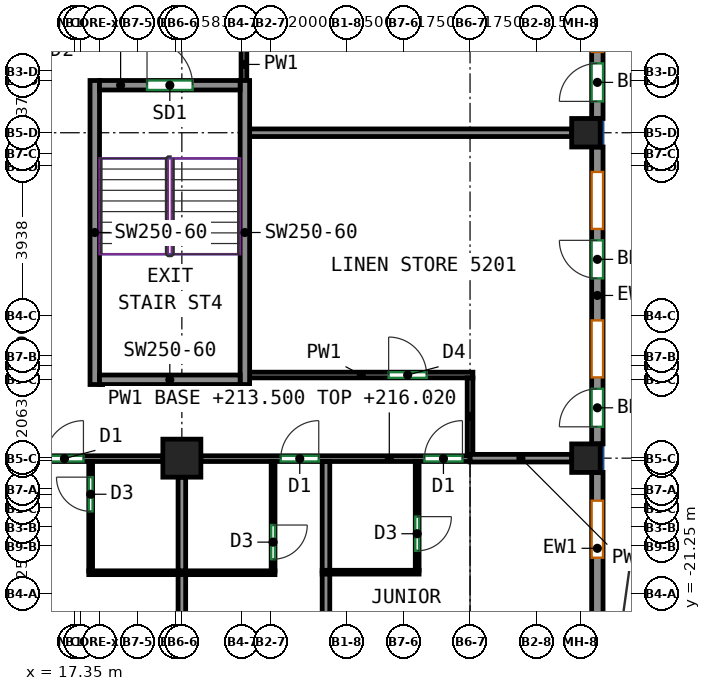
"""IFC4 building model, lengths in metres.
Left out: names, types, materials, properties, quantities, classifications, styles, units other than length and angle.
Written with IfcOpenShell. Run it as: python <this file> out.ifc"""

import sys

from ifc_helpers import new_model, si_unit, direction, frame, frame_2d, origin, origin_2d, place, context, subcontext, project, spatial, rectangle, extrude, source, transform, mapped, element, fill, save


model = new_model("IFC4")
c1 = context("Model", 3, precision=1e-05, world=origin(), true_north=direction((0.0, 1.0)))
c2 = subcontext(c1, "Body", "Model", "MODEL_VIEW")
j1 = project(units=[si_unit("LENGTHUNIT", "METRE"), si_unit("PLANEANGLEUNIT", "RADIAN")], contexts=[c1])
p1 = place(None, origin())
s1 = spatial("IfcSite", under=j1, at=p1, CompositionType="ELEMENT")
p2 = place(p1, origin())
s2 = spatial("IfcBuilding", under=s1, at=p2, CompositionType="ELEMENT")
p3 = place(p2, frame((0.0, 0.0, 213.5)))
s3 = spatial("IfcBuildingStorey", under=s2, at=p3, CompositionType="ELEMENT", Elevation=213.5)
m1 = source(origin(), c2, "Body", "SweptSolid", [
    extrude(rectangle(XDim=1.0, YDim=1.0, at=origin_2d()), origin(), (0.0, 0.0, 1.0), 3.12),
])
p4 = place(p3, frame((20.167, -17.688, 0.0), z_axis=(0.0, 0.0, 1.0), x_axis=(1.0, 0.0, 0.0)))
e1 = element("IfcColumn", 1, at=p4, inside=s3, PredefinedType="COLUMN", context=c2, shape_type="MappedRepresentation", body=[
    mapped(m1, transform((0.0, 0.0, 0.0))),
])
m2 = source(origin(), c2, "Body", "SweptSolid", [
    extrude(rectangle(XDim=0.75, YDim=0.75, at=origin_2d()), origin(), (0.0, 0.0, 1.0), 3.12),
])
for number, where, z_axis, x_axis in (
    (2, (30.8, -17.688, 0.0), (0.0, 0.0, 1.0), (1.0, 0.0, 0.0)),
    (3, (30.8, -9.125, 0.0), (0.0, 0.0, 1.0), (1.0, 0.0, 0.0)),
):
    element("IfcColumn", number, at=place(p3, frame(where, z_axis=z_axis, x_axis=x_axis)), inside=s3, PredefinedType="COLUMN", context=c2, shape_type="MappedRepresentation", body=[
        mapped(m2, transform((0.0, 0.0, 0.0))),
    ])
m3 = source(origin(), c2, "Body", "SweptSolid", [
    extrude(rectangle(XDim=8.0, YDim=0.25, at=frame_2d((4.0, 0.0))), origin(), (0.0, 0.0, 1.0), 3.12),
])
for number, where, z_axis, x_axis in (
    (4, (17.875, -15.75, 0.0), (0.0, 0.0, 1.0), (0.0, 1.0, 0.0)),
    (5, (21.825, -15.75, 0.0), (0.0, 0.0, 1.0), (0.0, 1.0, 0.0)),
):
    element("IfcWall", number, at=place(p3, frame(where, z_axis=z_axis, x_axis=x_axis)), inside=s3, PredefinedType="SHEAR", context=c2, shape_type="MappedRepresentation", body=[
        mapped(m3, transform((0.0, 0.0, 0.0))),
    ])
m4 = source(origin(), c2, "Body", "SweptSolid", [
    extrude(rectangle(XDim=3.7, YDim=0.25, at=frame_2d((1.85, 0.0))), origin(), (0.0, 0.0, 1.0), 3.12),
])
p5 = place(p3, frame((18.0, -15.625, 0.0), z_axis=(0.0, 0.0, 1.0), x_axis=(1.0, 0.0, 0.0)))
e6 = element("IfcWall", 6, at=p5, inside=s3, PredefinedType="SHEAR", context=c2, shape_type="MappedRepresentation", body=[
    mapped(m4, transform((0.0, 0.0, 0.0))),
])
p6 = place(p3, frame((18.0, -7.875, 0.0), z_axis=(0.0, 0.0, 1.0), x_axis=(1.0, 0.0, 0.0)))
e7 = element("IfcWall", 7, at=p6, inside=s3, PredefinedType="SHEAR", context=c2, shape_type="MappedRepresentation", body=[
    mapped(m4, transform((0.0, 0.0, 0.0))),
])
p7 = place(p6, frame((1.25, 0.0, 0.0)))
e8 = element("IfcOpeningElement", 8, at=p7, cuts=e7, PredefinedType="OPENING", context=c2, shape_type="SweptSolid", body=[
    extrude(rectangle(XDim=1.2, YDim=2.1, at=frame_2d((0.6, 1.05))), frame((0.0, 0.135, 0.0), z_axis=(0.0, -1.0, 0.0), x_axis=(1.0, 0.0, 0.0)), (0.0, 0.0, 1.0), 0.27),
])
m5 = source(origin(), c2, "Body", "SweptSolid", [
    extrude(rectangle(XDim=3.994, YDim=0.3, at=frame_2d((1.997, 0.0))), origin(), (0.0, 0.0, 1.0), 3.12),
])
p8 = place(p3, frame((31.1, -22.057, 0.0), z_axis=(0.0, 0.0, 1.0), x_axis=(0.0, 1.0, 0.0)))
e9 = element("IfcWall", 9, at=p8, inside=s3, PredefinedType="SOLIDWALL", context=c2, shape_type="MappedRepresentation", body=[
    mapped(m5, transform((0.0, 0.0, 0.0))),
])
p9 = place(p8, frame((1.75, 0.0, 0.85)))
e10 = element("IfcOpeningElement", 10, at=p9, cuts=e9, PredefinedType="OPENING", context=c2, shape_type="SweptSolid", body=[
    extrude(rectangle(XDim=1.5, YDim=1.95, at=frame_2d((0.75, 0.975))), frame((0.0, 0.16, 0.0), z_axis=(0.0, -1.0, 0.0), x_axis=(1.0, 0.0, 0.0)), (0.0, 0.0, 1.0), 0.32),
])
m6 = source(origin(), c2, "Body", "SweptSolid", [
    extrude(rectangle(XDim=7.812, YDim=0.3, at=frame_2d((3.906, 0.0))), origin(), (0.0, 0.0, 1.0), 3.12),
])
p10 = place(p3, frame((31.1, -17.312, 0.0), z_axis=(0.0, 0.0, 1.0), x_axis=(0.0, 1.0, 0.0)))
e11 = element("IfcWall", 11, at=p10, inside=s3, PredefinedType="SOLIDWALL", context=c2, shape_type="MappedRepresentation", body=[
    mapped(m6, transform((0.0, 0.0, 0.0))),
])
p11 = place(p10, frame((1.75, 0.0, 0.85)))
e12 = element("IfcOpeningElement", 12, at=p11, cuts=e11, PredefinedType="OPENING", context=c2, shape_type="SweptSolid", body=[
    extrude(rectangle(XDim=1.5, YDim=1.95, at=frame_2d((0.75, 0.975))), frame((0.0, 0.16, 0.0), z_axis=(0.0, -1.0, 0.0), x_axis=(1.0, 0.0, 0.0)), (0.0, 0.0, 1.0), 0.32),
])
p12 = place(p10, frame((0.45, 0.0, 0.0)))
e13 = element("IfcOpeningElement", 13, at=p12, cuts=e11, PredefinedType="OPENING", context=c2, shape_type="SweptSolid", body=[
    extrude(rectangle(XDim=1.0, YDim=2.1, at=frame_2d((0.5, 1.05))), frame((0.0, 0.16, 0.0), z_axis=(0.0, -1.0, 0.0), x_axis=(1.0, 0.0, 0.0)), (0.0, 0.0, 1.0), 0.32),
])
p13 = place(p10, frame((5.656, 0.0, 0.85)))
e14 = element("IfcOpeningElement", 14, at=p13, cuts=e11, PredefinedType="OPENING", context=c2, shape_type="SweptSolid", body=[
    extrude(rectangle(XDim=1.5, YDim=1.95, at=frame_2d((0.75, 0.975))), frame((0.0, 0.16, 0.0), z_axis=(0.0, -1.0, 0.0), x_axis=(1.0, 0.0, 0.0)), (0.0, 0.0, 1.0), 0.32),
])
p14 = place(p10, frame((4.356, 0.0, 0.0)))
e15 = element("IfcOpeningElement", 15, at=p14, cuts=e11, PredefinedType="OPENING", context=c2, shape_type="SweptSolid", body=[
    extrude(rectangle(XDim=1.0, YDim=2.1, at=frame_2d((0.5, 1.05))), frame((0.0, 0.16, 0.0), z_axis=(0.0, -1.0, 0.0), x_axis=(1.0, 0.0, 0.0)), (0.0, 0.0, 1.0), 0.32),
])
p15 = place(p3, frame((31.1, -8.75, 0.0), z_axis=(0.0, 0.0, 1.0), x_axis=(0.0, 1.0, 0.0)))
e16 = element("IfcWall", 16, at=p15, inside=s3, PredefinedType="SOLIDWALL", context=c2, shape_type="MappedRepresentation", body=[
    mapped(m6, transform((0.0, 0.0, 0.0))),
])
p16 = place(p15, frame((1.75, 0.0, 0.85)))
e17 = element("IfcOpeningElement", 17, at=p16, cuts=e16, PredefinedType="OPENING", context=c2, shape_type="SweptSolid", body=[
    extrude(rectangle(XDim=1.5, YDim=1.95, at=frame_2d((0.75, 0.975))), frame((0.0, 0.16, 0.0), z_axis=(0.0, -1.0, 0.0), x_axis=(1.0, 0.0, 0.0)), (0.0, 0.0, 1.0), 0.32),
])
p17 = place(p15, frame((0.45, 0.0, 0.0)))
e18 = element("IfcOpeningElement", 18, at=p17, cuts=e16, PredefinedType="OPENING", context=c2, shape_type="SweptSolid", body=[
    extrude(rectangle(XDim=1.0, YDim=2.1, at=frame_2d((0.5, 1.05))), frame((0.0, 0.16, 0.0), z_axis=(0.0, -1.0, 0.0), x_axis=(1.0, 0.0, 0.0)), (0.0, 0.0, 1.0), 0.32),
])
p18 = place(p15, frame((5.656, 0.0, 0.85)))
e19 = element("IfcOpeningElement", 19, at=p18, cuts=e16, PredefinedType="OPENING", context=c2, shape_type="SweptSolid", body=[
    extrude(rectangle(XDim=1.5, YDim=1.95, at=frame_2d((0.75, 0.975))), frame((0.0, 0.16, 0.0), z_axis=(0.0, -1.0, 0.0), x_axis=(1.0, 0.0, 0.0)), (0.0, 0.0, 1.0), 0.32),
])
p19 = place(p15, frame((4.356, 0.0, 0.0)))
e20 = element("IfcOpeningElement", 20, at=p19, cuts=e16, PredefinedType="OPENING", context=c2, shape_type="SweptSolid", body=[
    extrude(rectangle(XDim=1.0, YDim=2.1, at=frame_2d((0.5, 1.05))), frame((0.0, 0.16, 0.0), z_axis=(0.0, -1.0, 0.0), x_axis=(1.0, 0.0, 0.0)), (0.0, 0.0, 1.0), 0.32),
])
p20 = place(p3, frame((13.083, -17.7, 0.0), z_axis=(0.0, 0.0, 1.0), x_axis=(1.0, 0.0, 0.0)))
e21 = element("IfcWall", 21, at=p20, inside=s3, PredefinedType="PARTITIONING", context=c2, shape_type="SweptSolid", body=[
    extrude(rectangle(XDim=6.584, YDim=0.15, at=frame_2d((3.292, 0.0))), origin(), (0.0, 0.0, 1.0), 3.12),
])
p21 = place(p20, frame((2.102, 0.0, 0.0)))
e22 = element("IfcOpeningElement", 22, at=p21, cuts=e21, PredefinedType="OPENING", context=c2, shape_type="SweptSolid", body=[
    extrude(rectangle(XDim=1.0, YDim=2.1, at=frame_2d((0.5, 1.05))), frame((0.0, 0.085, 0.0), z_axis=(0.0, -1.0, 0.0), x_axis=(1.0, 0.0, 0.0)), (0.0, 0.0, 1.0), 0.17),
])
p22 = place(p20, frame((3.494, 0.0, 0.0)))
e23 = element("IfcOpeningElement", 23, at=p22, cuts=e21, PredefinedType="OPENING", context=c2, shape_type="SweptSolid", body=[
    extrude(rectangle(XDim=1.0, YDim=2.1, at=frame_2d((0.5, 1.05))), frame((0.0, 0.085, 0.0), z_axis=(0.0, -1.0, 0.0), x_axis=(1.0, 0.0, 0.0)), (0.0, 0.0, 1.0), 0.17),
])
p23 = place(p3, frame((20.667, -17.7, 0.0), z_axis=(0.0, 0.0, 1.0), x_axis=(1.0, 0.0, 0.0)))
e24 = element("IfcWall", 24, at=p23, inside=s3, PredefinedType="PARTITIONING", context=c2, shape_type="SweptSolid", body=[
    extrude(rectangle(XDim=7.083, YDim=0.15, at=frame_2d((3.542, 0.0))), origin(), (0.0, 0.0, 1.0), 2.52),
])
p24 = place(p23, frame((2.102, 0.0, 0.0)))
e25 = element("IfcOpeningElement", 25, at=p24, cuts=e24, PredefinedType="OPENING", context=c2, shape_type="SweptSolid", body=[
    extrude(rectangle(XDim=1.0, YDim=2.1, at=frame_2d((0.5, 1.05))), frame((0.0, 0.085, 0.0), z_axis=(0.0, -1.0, 0.0), x_axis=(1.0, 0.0, 0.0)), (0.0, 0.0, 1.0), 0.17),
])
p25 = place(p23, frame((5.883, 0.0, 0.0)))
e26 = element("IfcOpeningElement", 26, at=p25, cuts=e24, PredefinedType="OPENING", context=c2, shape_type="SweptSolid", body=[
    extrude(rectangle(XDim=1.0, YDim=2.1, at=frame_2d((0.5, 1.05))), frame((0.0, 0.085, 0.0), z_axis=(0.0, -1.0, 0.0), x_axis=(1.0, 0.0, 0.0)), (0.0, 0.0, 1.0), 0.17),
])
p26 = place(p3, frame((21.8, -7.75, 0.0), z_axis=(0.0, 0.0, 1.0), x_axis=(0.0, 1.0, 0.0)))
e27 = element("IfcWall", 27, at=p26, inside=s3, PredefinedType="PARTITIONING", context=c2, shape_type="SweptSolid", body=[
    extrude(rectangle(XDim=2.817, YDim=0.15, at=frame_2d((1.408, 0.0))), origin(), (0.0, 0.0, 1.0), 3.12),
])
p27 = place(p26, frame((1.009, 0.0, 0.0)))
e28 = element("IfcOpeningElement", 28, at=p27, cuts=e27, PredefinedType="OPENING", context=c2, shape_type="SweptSolid", body=[
    extrude(rectangle(XDim=0.9, YDim=2.1, at=frame_2d((0.45, 1.05))), frame((0.0, 0.085, 0.0), z_axis=(0.0, -1.0, 0.0), x_axis=(1.0, 0.0, 0.0)), (0.0, 0.0, 1.0), 0.17),
])
p28 = place(p3, frame((21.95, -15.5, 0.0), z_axis=(0.0, 0.0, 1.0), x_axis=(1.0, 0.0, 0.0)))
e29 = element("IfcWall", 29, at=p28, inside=s3, PredefinedType="PARTITIONING", context=c2, shape_type="SweptSolid", body=[
    extrude(rectangle(XDim=5.875, YDim=0.15, at=frame_2d((2.938, 0.0))), origin(), (0.0, 0.0, 1.0), 3.12),
])
p29 = place(p28, frame((3.658, 0.0, 0.0)))
e30 = element("IfcOpeningElement", 30, at=p29, cuts=e29, PredefinedType="OPENING", context=c2, shape_type="SweptSolid", body=[
    extrude(rectangle(XDim=1.0, YDim=2.1, at=frame_2d((0.5, 1.05))), frame((0.0, 0.085, 0.0), z_axis=(0.0, -1.0, 0.0), x_axis=(1.0, 0.0, 0.0)), (0.0, 0.0, 1.0), 0.17),
])
p30 = place(p3, frame((27.75, -17.598, 0.0), z_axis=(0.0, 0.0, 1.0), x_axis=(0.0, 1.0, 0.0)))
e31 = element("IfcWall", 31, at=p30, inside=s3, PredefinedType="PARTITIONING", context=c2, shape_type="SweptSolid", body=[
    extrude(rectangle(XDim=2.023, YDim=0.15, at=frame_2d((1.011, 0.0))), origin(), (0.0, 0.0, 1.0), 2.52),
])
p31 = place(p3, frame((17.767, -20.652, 0.0), z_axis=(0.0, 0.0, 1.0), x_axis=(0.0, 1.0, 0.0)))
e32 = element("IfcWall", 32, at=p31, inside=s3, PredefinedType="PARTITIONING", context=c2, shape_type="SweptSolid", body=[
    extrude(rectangle(XDim=2.875, YDim=0.1, at=frame_2d((1.438, 0.0))), origin(), (0.0, 0.0, 1.0), 3.12),
])
p32 = place(p31, frame((1.565, 0.0, 0.0)))
e33 = element("IfcOpeningElement", 33, at=p32, cuts=e32, PredefinedType="OPENING", context=c2, shape_type="SweptSolid", body=[
    extrude(rectangle(XDim=0.9, YDim=2.1, at=frame_2d((0.45, 1.05))), frame((0.0, 0.06, 0.0), z_axis=(0.0, -1.0, 0.0), x_axis=(1.0, 0.0, 0.0)), (0.0, 0.0, 1.0), 0.12),
])
p33 = place(p3, frame((17.717, -20.702, 0.0), z_axis=(0.0, 0.0, 1.0), x_axis=(1.0, 0.0, 0.0)))
e34 = element("IfcWall", 34, at=p33, inside=s3, PredefinedType="PARTITIONING", context=c2, shape_type="SweptSolid", body=[
    extrude(rectangle(XDim=4.9, YDim=0.1, at=frame_2d((2.45, 0.0))), origin(), (0.0, 0.0, 1.0), 3.12),
])
p34 = place(p3, frame((20.167, -25.425, 0.0), z_axis=(0.0, 0.0, 1.0), x_axis=(0.0, 1.0, 0.0)))
e35 = element("IfcWall", 35, at=p34, inside=s3, PredefinedType="PARTITIONING", context=c2, shape_type="SweptSolid", body=[
    extrude(rectangle(XDim=4.673, YDim=0.2, at=frame_2d((2.336, 0.0))), origin(), (0.0, 0.0, 1.0), 3.12),
])
p35 = place(p3, frame((20.167, -20.652, 0.0), z_axis=(0.0, 0.0, 1.0), x_axis=(0.0, 1.0, 0.0)))
e36 = element("IfcWall", 36, at=p35, inside=s3, PredefinedType="PARTITIONING", context=c2, shape_type="SweptSolid", body=[
    extrude(rectangle(XDim=2.464, YDim=0.2, at=frame_2d((1.232, 0.0))), origin(), (0.0, 0.0, 1.0), 3.12),
])
p36 = place(p3, frame((22.567, -17.777, 0.0), z_axis=(0.0, 0.0, 1.0), x_axis=(0.0, -1.0, 0.0)))
e37 = element("IfcWall", 37, at=p36, inside=s3, PredefinedType="PARTITIONING", context=c2, shape_type="SweptSolid", body=[
    extrude(rectangle(XDim=2.875, YDim=0.1, at=frame_2d((1.438, 0.0))), origin(), (0.0, 0.0, 1.0), 3.12),
])
p37 = place(p36, frame((1.67, 0.0, 0.0)))
e38 = element("IfcOpeningElement", 38, at=p37, cuts=e37, PredefinedType="OPENING", context=c2, shape_type="SweptSolid", body=[
    extrude(rectangle(XDim=0.9, YDim=2.1, at=frame_2d((0.45, 1.05))), frame((0.0, 0.06, 0.0), z_axis=(0.0, -1.0, 0.0), x_axis=(1.0, 0.0, 0.0)), (0.0, 0.0, 1.0), 0.12),
])
p38 = place(p3, frame((23.959, -26.0, 0.0), z_axis=(0.0, 0.0, 1.0), x_axis=(0.0, 1.0, 0.0)))
e39 = element("IfcWall", 39, at=p38, inside=s3, PredefinedType="PARTITIONING", context=c2, shape_type="SweptSolid", body=[
    extrude(rectangle(XDim=5.272, YDim=0.2, at=frame_2d((2.636, 0.0))), origin(), (0.0, 0.0, 1.0), 3.12),
])
p39 = place(p3, frame((23.959, -20.648, 0.0), z_axis=(0.0, 0.0, 1.0), x_axis=(0.0, 1.0, 0.0)))
e40 = element("IfcWall", 40, at=p39, inside=s3, PredefinedType="PARTITIONING", context=c2, shape_type="SweptSolid", body=[
    extrude(rectangle(XDim=2.871, YDim=0.2, at=frame_2d((1.436, 0.0))), origin(), (0.0, 0.0, 1.0), 3.12),
])
p40 = place(p3, frame((23.859, -20.688, 0.0), z_axis=(0.0, 0.0, 1.0), x_axis=(1.0, 0.0, 0.0)))
e41 = element("IfcWall", 41, at=p40, inside=s3, PredefinedType="PARTITIONING", context=c2, shape_type="SweptSolid", body=[
    extrude(rectangle(XDim=2.55, YDim=0.1, at=frame_2d((1.275, 0.0))), origin(), (0.0, 0.0, 1.0), 3.12),
])
p41 = place(p3, frame((26.359, -17.777, 0.0), z_axis=(0.0, 0.0, 1.0), x_axis=(0.0, -1.0, 0.0)))
e42 = element("IfcWall", 42, at=p41, inside=s3, PredefinedType="PARTITIONING", context=c2, shape_type="SweptSolid", body=[
    extrude(rectangle(XDim=2.861, YDim=0.1, at=frame_2d((1.43, 0.0))), origin(), (0.0, 0.0, 1.0), 3.12),
])
p42 = place(p41, frame((1.449, 0.0, 0.0)))
e43 = element("IfcOpeningElement", 43, at=p42, cuts=e42, PredefinedType="OPENING", context=c2, shape_type="SweptSolid", body=[
    extrude(rectangle(XDim=0.9, YDim=2.1, at=frame_2d((0.45, 1.05))), frame((0.0, 0.06, 0.0), z_axis=(0.0, -1.0, 0.0), x_axis=(1.0, 0.0, 0.0)), (0.0, 0.0, 1.0), 0.12),
])
p43 = place(p3, frame((27.752, -17.688, 0.0), z_axis=(0.0, 0.0, 1.0), x_axis=(1.0, 0.0, 0.0)))
e44 = element("IfcWall", 44, at=p43, inside=s3, PredefinedType="PARTITIONING", context=c2, shape_type="SweptSolid", body=[
    extrude(rectangle(XDim=2.673, YDim=0.2, at=frame_2d((1.336, 0.0))), origin(), (0.0, 0.0, 1.0), 2.52),
])
p44 = place(p3, frame((21.95, -9.125, 0.0), z_axis=(0.0, 0.0, 1.0), x_axis=(1.0, 0.0, 0.0)))
e45 = element("IfcWall", 45, at=p44, inside=s3, PredefinedType="PARTITIONING", context=c2, shape_type="SweptSolid", body=[
    extrude(rectangle(XDim=8.475, YDim=0.2, at=frame_2d((4.238, 0.0))), origin(), (0.0, 0.0, 1.0), 3.12),
])
p45 = place(p9, origin())
e46 = element("IfcWindow", 46, at=p45, inside=s3, PartitioningType="SINGLE_PANEL", PredefinedType="WINDOW", context=c2, shape_type="SweptSolid", body=[
    extrude(rectangle(XDim=1.5, YDim=1.95, at=frame_2d((0.75, 0.975))), frame((0.0, 0.03, 0.0), z_axis=(0.0, -1.0, 0.0), x_axis=(1.0, 0.0, 0.0)), (0.0, 0.0, 1.0), 0.06),
])
fill(e10, e46)
p46 = place(p11, origin())
e47 = element("IfcWindow", 47, at=p46, inside=s3, PartitioningType="SINGLE_PANEL", PredefinedType="WINDOW", context=c2, shape_type="SweptSolid", body=[
    extrude(rectangle(XDim=1.5, YDim=1.95, at=frame_2d((0.75, 0.975))), frame((0.0, 0.03, 0.0), z_axis=(0.0, -1.0, 0.0), x_axis=(1.0, 0.0, 0.0)), (0.0, 0.0, 1.0), 0.06),
])
fill(e12, e47)
p47 = place(p12, origin())
e48 = element("IfcDoor", 48, at=p47, inside=s3, OperationType="SINGLE_SWING_LEFT", PredefinedType="DOOR", context=c2, shape_type="SweptSolid", body=[
    extrude(rectangle(XDim=1.0, YDim=2.1, at=frame_2d((0.5, 1.05))), frame((0.0, 0.025, 0.0), z_axis=(0.0, -1.0, 0.0), x_axis=(1.0, 0.0, 0.0)), (0.0, 0.0, 1.0), 0.05),
])
fill(e13, e48)
p48 = place(p13, origin())
e49 = element("IfcWindow", 49, at=p48, inside=s3, PartitioningType="SINGLE_PANEL", PredefinedType="WINDOW", context=c2, shape_type="SweptSolid", body=[
    extrude(rectangle(XDim=1.5, YDim=1.95, at=frame_2d((0.75, 0.975))), frame((0.0, 0.03, 0.0), z_axis=(0.0, -1.0, 0.0), x_axis=(1.0, 0.0, 0.0)), (0.0, 0.0, 1.0), 0.06),
])
fill(e14, e49)
p49 = place(p14, origin())
e50 = element("IfcDoor", 50, at=p49, inside=s3, OperationType="SINGLE_SWING_RIGHT", PredefinedType="DOOR", context=c2, shape_type="SweptSolid", body=[
    extrude(rectangle(XDim=1.0, YDim=2.1, at=frame_2d((0.5, 1.05))), frame((0.0, 0.025, 0.0), z_axis=(0.0, -1.0, 0.0), x_axis=(1.0, 0.0, 0.0)), (0.0, 0.0, 1.0), 0.05),
])
fill(e15, e50)
p50 = place(p17, origin())
e51 = element("IfcDoor", 51, at=p50, inside=s3, OperationType="SINGLE_SWING_LEFT", PredefinedType="DOOR", context=c2, shape_type="SweptSolid", body=[
    extrude(rectangle(XDim=1.0, YDim=2.1, at=frame_2d((0.5, 1.05))), frame((0.0, 0.025, 0.0), z_axis=(0.0, -1.0, 0.0), x_axis=(1.0, 0.0, 0.0)), (0.0, 0.0, 1.0), 0.05),
])
fill(e18, e51)
p51 = place(p7, origin())
e52 = element("IfcDoor", 52, at=p51, inside=s3, OperationType="DOUBLE_DOOR_SINGLE_SWING", PredefinedType="DOOR", context=c2, shape_type="SweptSolid", body=[
    extrude(rectangle(XDim=1.2, YDim=2.1, at=frame_2d((0.6, 1.05))), frame((0.0, 0.025, 0.0), z_axis=(0.0, -1.0, 0.0), x_axis=(1.0, 0.0, 0.0)), (0.0, 0.0, 1.0), 0.05),
])
fill(e8, e52)
p52 = place(p37, origin())
e53 = element("IfcDoor", 53, at=p52, inside=s3, OperationType="SINGLE_SWING_LEFT", PredefinedType="DOOR", context=c2, shape_type="SweptSolid", body=[
    extrude(rectangle(XDim=0.9, YDim=2.1, at=frame_2d((0.45, 1.05))), frame((0.0, 0.025, 0.0), z_axis=(0.0, -1.0, 0.0), x_axis=(1.0, 0.0, 0.0)), (0.0, 0.0, 1.0), 0.05),
])
fill(e38, e53)
p53 = place(p42, origin())
e54 = element("IfcDoor", 54, at=p53, inside=s3, OperationType="SINGLE_SWING_LEFT", PredefinedType="DOOR", context=c2, shape_type="SweptSolid", body=[
    extrude(rectangle(XDim=0.9, YDim=2.1, at=frame_2d((0.45, 1.05))), frame((0.0, 0.025, 0.0), z_axis=(0.0, -1.0, 0.0), x_axis=(1.0, 0.0, 0.0)), (0.0, 0.0, 1.0), 0.05),
])
fill(e43, e54)
p54 = place(p32, origin())
e55 = element("IfcDoor", 55, at=p54, inside=s3, OperationType="SINGLE_SWING_RIGHT", PredefinedType="DOOR", context=c2, shape_type="SweptSolid", body=[
    extrude(rectangle(XDim=0.9, YDim=2.1, at=frame_2d((0.45, 1.05))), frame((0.0, 0.025, 0.0), z_axis=(0.0, -1.0, 0.0), x_axis=(1.0, 0.0, 0.0)), (0.0, 0.0, 1.0), 0.05),
])
fill(e33, e55)
p55 = place(p22, origin())
e56 = element("IfcDoor", 56, at=p55, inside=s3, OperationType="SINGLE_SWING_RIGHT", PredefinedType="DOOR", context=c2, shape_type="SweptSolid", body=[
    extrude(rectangle(XDim=1.0, YDim=2.1, at=frame_2d((0.5, 1.05))), frame((0.0, 0.025, 0.0), z_axis=(0.0, -1.0, 0.0), x_axis=(1.0, 0.0, 0.0)), (0.0, 0.0, 1.0), 0.05),
])
fill(e23, e56)
p56 = place(p24, origin())
e57 = element("IfcDoor", 57, at=p56, inside=s3, OperationType="SINGLE_SWING_RIGHT", PredefinedType="DOOR", context=c2, shape_type="SweptSolid", body=[
    extrude(rectangle(XDim=1.0, YDim=2.1, at=frame_2d((0.5, 1.05))), frame((0.0, 0.025, 0.0), z_axis=(0.0, -1.0, 0.0), x_axis=(1.0, 0.0, 0.0)), (0.0, 0.0, 1.0), 0.05),
])
fill(e25, e57)
p57 = place(p25, origin())
e58 = element("IfcDoor", 58, at=p57, inside=s3, OperationType="SINGLE_SWING_RIGHT", PredefinedType="DOOR", context=c2, shape_type="SweptSolid", body=[
    extrude(rectangle(XDim=1.0, YDim=2.1, at=frame_2d((0.5, 1.05))), frame((0.0, 0.025, 0.0), z_axis=(0.0, -1.0, 0.0), x_axis=(1.0, 0.0, 0.0)), (0.0, 0.0, 1.0), 0.05),
])
fill(e26, e58)
p58 = place(p29, origin())
e59 = element("IfcDoor", 59, at=p58, inside=s3, OperationType="SINGLE_SWING_LEFT", PredefinedType="DOOR", context=c2, shape_type="SweptSolid", body=[
    extrude(rectangle(XDim=1.0, YDim=2.1, at=frame_2d((0.5, 1.05))), frame((0.0, 0.025, 0.0), z_axis=(0.0, -1.0, 0.0), x_axis=(1.0, 0.0, 0.0)), (0.0, 0.0, 1.0), 0.05),
])
fill(e30, e59)
save(model, sys.argv[1])
